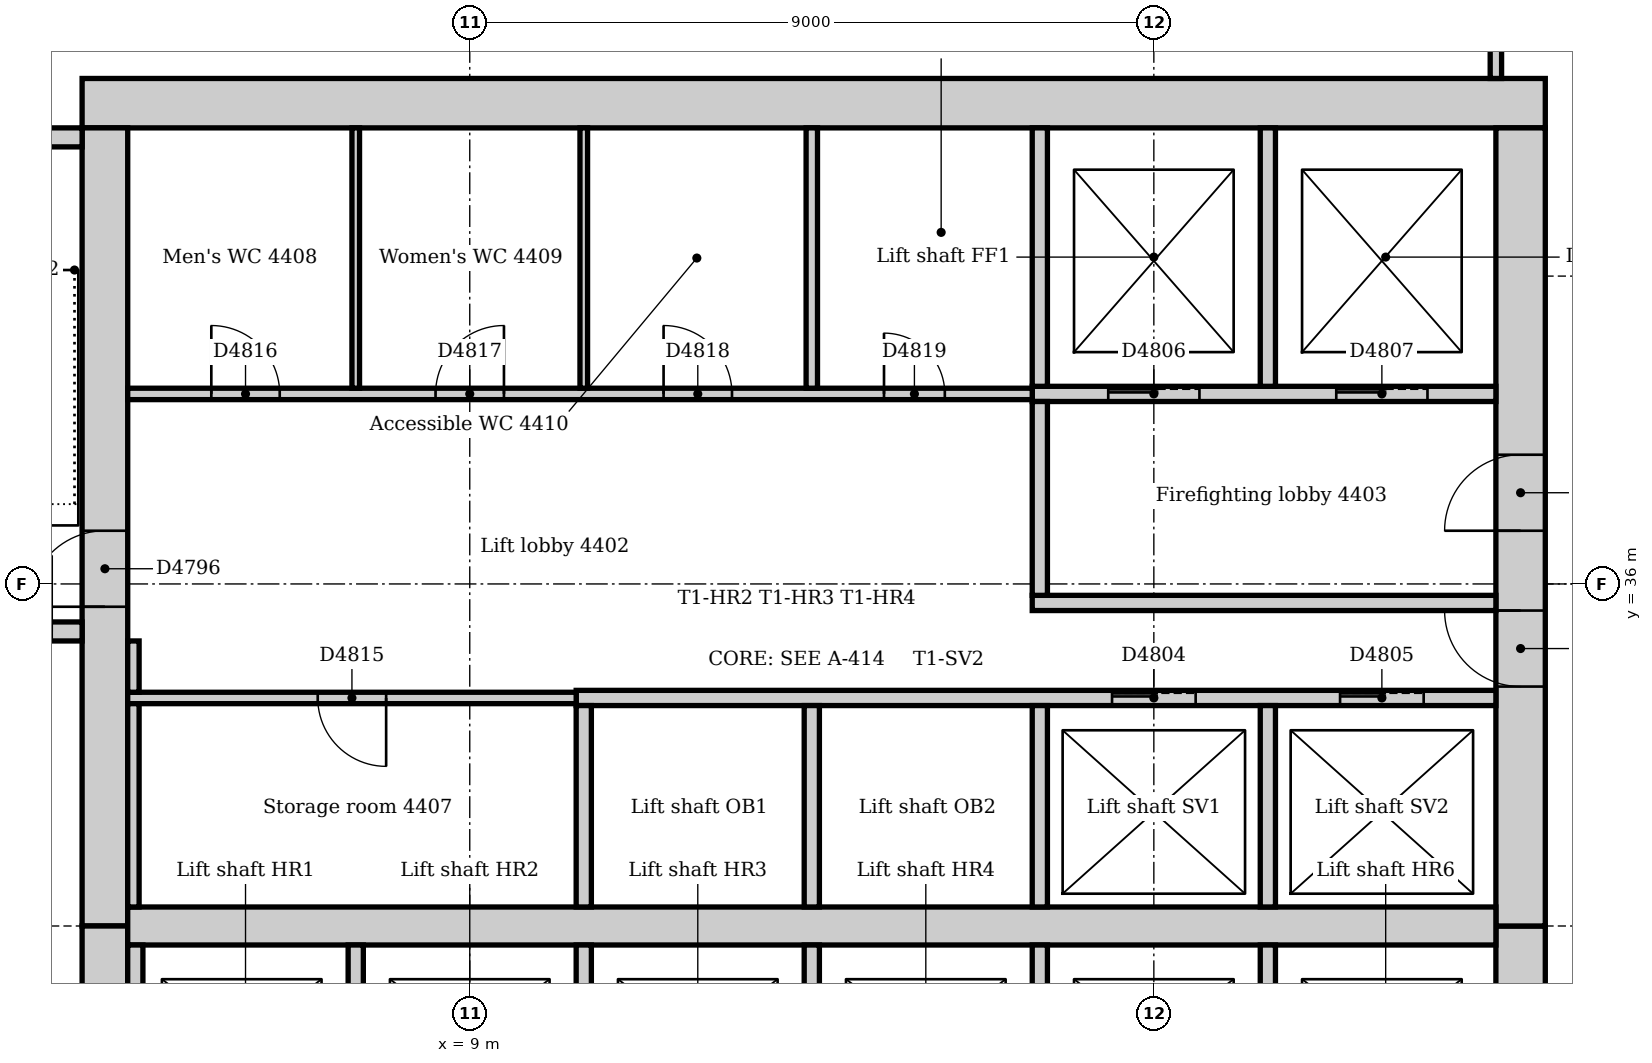
"""IFC4 building model, lengths in metres.
Left out: names, types, materials, properties, quantities, classifications, styles, units other than length and angle.
Written with IfcOpenShell. Run it as: python <this file> out.ifc"""

import sys

from ifc_helpers import new_model, si_unit, direction, frame, frame_2d, origin, place, context, subcontext, project, spatial, rectangle, extrude, element, fill, save


model = new_model("IFC4")
c1 = context("Model", 3, precision=1e-05, world=origin(), true_north=direction((0.0, 1.0)))
c2 = subcontext(c1, "Body", "Model", "MODEL_VIEW")
j1 = project(units=[si_unit("LENGTHUNIT", "METRE"), si_unit("PLANEANGLEUNIT", "RADIAN")], contexts=[c1])
p1 = place(None, origin())
s1 = spatial("IfcSite", under=j1, at=p1, CompositionType="ELEMENT")
p2 = place(p1, origin())
s2 = spatial("IfcBuilding", under=s1, at=p2, CompositionType="ELEMENT")
p3 = place(p2, frame((0.0, 0.0, 185.0)))
s3 = spatial("IfcBuildingStorey", under=s2, at=p3, CompositionType="ELEMENT", Elevation=185.0)
p4 = place(p3, frame((23.15, 42.325, 0.0), z_axis=(0.0, 0.0, 1.0), x_axis=(-1.0, 0.0, 0.0)))
e1 = element("IfcWall", 1, at=p4, inside=s3, PredefinedType="SOLIDWALL", context=c2, shape_type="SweptSolid", body=[
    extrude(rectangle(XDim=19.25, YDim=0.65, at=frame_2d((9.625, 0.0))), origin(), (0.0, 0.0, 1.0), 4.0),
])
p5 = place(p3, frame((22.825, 21.0, 0.0), z_axis=(0.0, 0.0, 1.0), x_axis=(0.0, 1.0, 0.0)))
e2 = element("IfcWall", 2, at=p5, inside=s3, PredefinedType="SOLIDWALL", context=c2, shape_type="SweptSolid", body=[
    extrude(rectangle(XDim=10.5, YDim=0.65, at=frame_2d((5.25, 0.0))), origin(), (0.0, 0.0, 1.0), 4.0),
])
p6 = place(p5, frame((4.35, 0.0, 0.0)))
e3 = element("IfcOpeningElement", 3, at=p6, cuts=e2, PredefinedType="OPENING", context=c2, shape_type="SweptSolid", body=[
    extrude(rectangle(XDim=1.8, YDim=2.1, at=frame_2d((0.9, 1.05))), frame((0.0, 0.335, 0.0), z_axis=(0.0, -1.0, 0.0), x_axis=(1.0, 0.0, 0.0)), (0.0, 0.0, 1.0), 0.67),
])
p7 = place(p3, frame((22.825, 31.5, 0.0), z_axis=(0.0, 0.0, 1.0), x_axis=(0.0, 1.0, 0.0)))
e4 = element("IfcWall", 4, at=p7, inside=s3, PredefinedType="SOLIDWALL", context=c2, shape_type="SweptSolid", body=[
    extrude(rectangle(XDim=10.5, YDim=0.65, at=frame_2d((5.25, 0.0))), origin(), (0.0, 0.0, 1.0), 4.0),
])
p8 = place(p7, frame((3.15, 0.0, 0.0)))
e5 = element("IfcOpeningElement", 5, at=p8, cuts=e4, PredefinedType="OPENING", context=c2, shape_type="SweptSolid", body=[
    extrude(rectangle(XDim=1.0, YDim=2.1, at=frame_2d((0.5, 1.05))), frame((0.0, 0.335, 0.0), z_axis=(0.0, -1.0, 0.0), x_axis=(1.0, 0.0, 0.0)), (0.0, 0.0, 1.0), 0.67),
])
p9 = place(p7, frame((5.2, 0.0, 0.0)))
e6 = element("IfcOpeningElement", 6, at=p9, cuts=e4, PredefinedType="OPENING", context=c2, shape_type="SweptSolid", body=[
    extrude(rectangle(XDim=1.0, YDim=2.1, at=frame_2d((0.5, 1.05))), frame((0.0, 0.335, 0.0), z_axis=(0.0, -1.0, 0.0), x_axis=(1.0, 0.0, 0.0)), (0.0, 0.0, 1.0), 0.67),
])
p10 = place(p3, frame((4.2, 42.0, 0.0), z_axis=(0.0, 0.0, 1.0), x_axis=(0.0, -1.0, 0.0)))
e7 = element("IfcWall", 7, at=p10, inside=s3, PredefinedType="SOLIDWALL", context=c2, shape_type="SweptSolid", body=[
    extrude(rectangle(XDim=10.5, YDim=0.6, at=frame_2d((5.25, 0.0))), origin(), (0.0, 0.0, 1.0), 4.0),
])
p11 = place(p10, frame((5.3, 0.0, 0.0)))
e8 = element("IfcOpeningElement", 8, at=p11, cuts=e7, PredefinedType="OPENING", context=c2, shape_type="SweptSolid", body=[
    extrude(rectangle(XDim=1.0, YDim=2.1, at=frame_2d((0.5, 1.05))), frame((0.0, 0.31, 0.0), z_axis=(0.0, -1.0, 0.0), x_axis=(1.0, 0.0, 0.0)), (0.0, 0.0, 1.0), 0.62),
])
p12 = place(p3, frame((4.2, 31.5, 0.0), z_axis=(0.0, 0.0, 1.0), x_axis=(0.0, -1.0, 0.0)))
e9 = element("IfcWall", 9, at=p12, inside=s3, PredefinedType="SOLIDWALL", context=c2, shape_type="SweptSolid", body=[
    extrude(rectangle(XDim=10.5, YDim=0.6, at=frame_2d((5.25, 0.0))), origin(), (0.0, 0.0, 1.0), 4.0),
])
p13 = place(p12, frame((4.25, 0.0, 0.0)))
e10 = element("IfcOpeningElement", 10, at=p13, cuts=e9, PredefinedType="OPENING", context=c2, shape_type="SweptSolid", body=[
    extrude(rectangle(XDim=1.0, YDim=2.1, at=frame_2d((0.5, 1.05))), frame((0.0, 0.31, 0.0), z_axis=(0.0, -1.0, 0.0), x_axis=(1.0, 0.0, 0.0)), (0.0, 0.0, 1.0), 0.62),
])
p14 = place(p3, frame((4.5, 31.5, 0.0), z_axis=(0.0, 0.0, 1.0), x_axis=(1.0, 0.0, 0.0)))
e11 = element("IfcWall", 11, at=p14, inside=s3, PredefinedType="SOLIDWALL", context=c2, shape_type="SweptSolid", body=[
    extrude(rectangle(XDim=18.0, YDim=0.5, at=frame_2d((9.0, 0.0))), origin(), (0.0, 0.0, 1.0), 4.0),
])
p15 = place(p3, frame((0.36, 35.375, 0.0), z_axis=(0.0, 0.0, 1.0), x_axis=(1.0, 0.0, 0.0)))
e12 = element("IfcWall", 12, at=p15, inside=s3, PredefinedType="SOLIDWALL", context=c2, shape_type="SweptSolid", body=[
    extrude(rectangle(XDim=3.54, YDim=0.25, at=frame_2d((1.77, 0.0))), origin(), (0.0, 0.0, 1.0), 4.0),
])
p16 = place(p15, frame((2.14, 0.0, 0.0)))
e13 = element("IfcOpeningElement", 13, at=p16, cuts=e12, PredefinedType="OPENING", context=c2, shape_type="SweptSolid", body=[
    extrude(rectangle(XDim=1.0, YDim=2.1, at=frame_2d((0.5, 1.05))), frame((0.0, 0.135, 0.0), z_axis=(0.0, -1.0, 0.0), x_axis=(1.0, 0.0, 0.0)), (0.0, 0.0, 1.0), 0.27),
])
p17 = place(p3, frame((3.9, 41.875, 0.0), z_axis=(0.0, 0.0, 1.0), x_axis=(-1.0, 0.0, 0.0)))
e14 = element("IfcWall", 14, at=p17, inside=s3, PredefinedType="SOLIDWALL", context=c2, shape_type="SweptSolid", body=[
    extrude(rectangle(XDim=3.54, YDim=0.25, at=frame_2d((1.77, 0.0))), origin(), (0.0, 0.0, 1.0), 4.0),
])
p18 = place(p3, frame((16.4, 35.75, 0.0), z_axis=(0.0, 0.0, 1.0), x_axis=(1.0, 0.0, 0.0)))
e15 = element("IfcWall", 15, at=p18, inside=s3, PredefinedType="PARTITIONING", context=c2, shape_type="SweptSolid", body=[
    extrude(rectangle(XDim=6.1, YDim=0.2, at=frame_2d((3.05, 0.0))), origin(), (0.0, 0.0, 1.0), 3.85),
])
p19 = place(p3, frame((16.4, 38.5, 0.0), z_axis=(0.0, 0.0, 1.0), x_axis=(1.0, 0.0, 0.0)))
e16 = element("IfcWall", 16, at=p19, inside=s3, PredefinedType="PARTITIONING", context=c2, shape_type="SweptSolid", body=[
    extrude(rectangle(XDim=6.1, YDim=0.2, at=frame_2d((3.05, 0.0))), origin(), (0.0, 0.0, 1.0), 3.85),
])
p20 = place(p19, frame((1.0, 0.0, 0.0)))
e17 = element("IfcOpeningElement", 17, at=p20, cuts=e16, PredefinedType="OPENING", context=c2, shape_type="SweptSolid", body=[
    extrude(rectangle(XDim=1.2, YDim=2.1, at=frame_2d((0.6, 1.05))), frame((0.0, 0.11, 0.0), z_axis=(0.0, -1.0, 0.0), x_axis=(1.0, 0.0, 0.0)), (0.0, 0.0, 1.0), 0.22),
])
p21 = place(p19, frame((4.0, 0.0, 0.0)))
e18 = element("IfcOpeningElement", 18, at=p21, cuts=e16, PredefinedType="OPENING", context=c2, shape_type="SweptSolid", body=[
    extrude(rectangle(XDim=1.2, YDim=2.1, at=frame_2d((0.6, 1.05))), frame((0.0, 0.11, 0.0), z_axis=(0.0, -1.0, 0.0), x_axis=(1.0, 0.0, 0.0)), (0.0, 0.0, 1.0), 0.22),
])
p22 = place(p3, frame((16.5, 35.85, 0.0), z_axis=(0.0, 0.0, 1.0), x_axis=(0.0, 1.0, 0.0)))
e19 = element("IfcWall", 19, at=p22, inside=s3, PredefinedType="PARTITIONING", context=c2, shape_type="SweptSolid", body=[
    extrude(rectangle(XDim=2.55, YDim=0.2, at=frame_2d((1.275, 0.0))), origin(), (0.0, 0.0, 1.0), 3.85),
])
p23 = place(p3, frame((10.4, 34.5, 0.0), z_axis=(0.0, 0.0, 1.0), x_axis=(1.0, 0.0, 0.0)))
e20 = element("IfcWall", 20, at=p23, inside=s3, PredefinedType="PARTITIONING", context=c2, shape_type="SweptSolid", body=[
    extrude(rectangle(XDim=12.1, YDim=0.2, at=frame_2d((6.05, 0.0))), origin(), (0.0, 0.0, 1.0), 3.85),
])
p24 = place(p23, frame((7.05, 0.0, 0.0)))
e21 = element("IfcOpeningElement", 21, at=p24, cuts=e20, PredefinedType="OPENING", context=c2, shape_type="SweptSolid", body=[
    extrude(rectangle(XDim=1.1, YDim=2.1, at=frame_2d((0.55, 1.05))), frame((0.0, 0.11, 0.0), z_axis=(0.0, -1.0, 0.0), x_axis=(1.0, 0.0, 0.0)), (0.0, 0.0, 1.0), 0.22),
])
p25 = place(p23, frame((10.05, 0.0, 0.0)))
e22 = element("IfcOpeningElement", 22, at=p25, cuts=e20, PredefinedType="OPENING", context=c2, shape_type="SweptSolid", body=[
    extrude(rectangle(XDim=1.1, YDim=2.1, at=frame_2d((0.55, 1.05))), frame((0.0, 0.11, 0.0), z_axis=(0.0, -1.0, 0.0), x_axis=(1.0, 0.0, 0.0)), (0.0, 0.0, 1.0), 0.22),
])
for number, where, z_axis, x_axis in (
    (23, (10.5, 28.6, 0.0), (0.0, 0.0, 1.0), (0.0, 1.0, 0.0)),
    (24, (10.5, 31.75, 0.0), (0.0, 0.0, 1.0), (0.0, 1.0, 0.0)),
    (25, (13.5, 28.6, 0.0), (0.0, 0.0, 1.0), (0.0, 1.0, 0.0)),
    (26, (13.5, 31.75, 0.0), (0.0, 0.0, 1.0), (0.0, 1.0, 0.0)),
    (27, (16.5, 28.6, 0.0), (0.0, 0.0, 1.0), (0.0, 1.0, 0.0)),
    (28, (16.5, 31.75, 0.0), (0.0, 0.0, 1.0), (0.0, 1.0, 0.0)),
    (29, (19.5, 28.6, 0.0), (0.0, 0.0, 1.0), (0.0, 1.0, 0.0)),
    (30, (19.5, 31.75, 0.0), (0.0, 0.0, 1.0), (0.0, 1.0, 0.0)),
):
    element("IfcWall", number, at=place(p3, frame(where, z_axis=z_axis, x_axis=x_axis)), inside=s3, PredefinedType="PARTITIONING", context=c2, shape_type="SweptSolid", body=[
        extrude(rectangle(XDim=2.65, YDim=0.2, at=frame_2d((1.325, 0.0))), origin(), (0.0, 0.0, 1.0), 3.85),
    ])
for number, where, z_axis, x_axis in (
    (31, (16.5, 38.6, 0.0), (0.0, 0.0, 1.0), (0.0, 1.0, 0.0)),
    (32, (19.5, 38.6, 0.0), (0.0, 0.0, 1.0), (0.0, 1.0, 0.0)),
):
    element("IfcWall", number, at=place(p3, frame(where, z_axis=z_axis, x_axis=x_axis)), inside=s3, PredefinedType="PARTITIONING", context=c2, shape_type="SweptSolid", body=[
        extrude(rectangle(XDim=3.4, YDim=0.2, at=frame_2d((1.7, 0.0))), origin(), (0.0, 0.0, 1.0), 3.85),
    ])
for number, where, z_axis, x_axis in (
    (33, (4.6, 28.6, 0.0), (0.0, 0.0, 1.0), (0.0, 1.0, 0.0)),
    (34, (7.5, 28.6, 0.0), (0.0, 0.0, 1.0), (0.0, 1.0, 0.0)),
):
    element("IfcWall", number, at=place(p3, frame(where, z_axis=z_axis, x_axis=x_axis)), inside=s3, PredefinedType="PARTITIONING", context=c2, shape_type="SweptSolid", body=[
        extrude(rectangle(XDim=2.65, YDim=0.2, at=frame_2d((1.325, 0.0))), origin(), (0.0, 0.0, 1.0), 3.85),
    ])
p26 = place(p3, frame((4.5, 38.5, 0.0), z_axis=(0.0, 0.0, 1.0), x_axis=(1.0, 0.0, 0.0)))
e35 = element("IfcWall", 35, at=p26, inside=s3, PredefinedType="PARTITIONING", context=c2, shape_type="SweptSolid", body=[
    extrude(rectangle(XDim=11.9, YDim=0.15, at=frame_2d((5.95, 0.0))), origin(), (0.0, 0.0, 1.0), 3.85),
])
p27 = place(p26, frame((1.1, 0.0, 0.0)))
e36 = element("IfcOpeningElement", 36, at=p27, cuts=e35, PredefinedType="OPENING", context=c2, shape_type="SweptSolid", body=[
    extrude(rectangle(XDim=0.9, YDim=2.1, at=frame_2d((0.45, 1.05))), frame((0.0, 0.085, 0.0), z_axis=(0.0, -1.0, 0.0), x_axis=(1.0, 0.0, 0.0)), (0.0, 0.0, 1.0), 0.17),
])
p28 = place(p26, frame((4.05, 0.0, 0.0)))
e37 = element("IfcOpeningElement", 37, at=p28, cuts=e35, PredefinedType="OPENING", context=c2, shape_type="SweptSolid", body=[
    extrude(rectangle(XDim=0.9, YDim=2.1, at=frame_2d((0.45, 1.05))), frame((0.0, 0.085, 0.0), z_axis=(0.0, -1.0, 0.0), x_axis=(1.0, 0.0, 0.0)), (0.0, 0.0, 1.0), 0.17),
])
p29 = place(p26, frame((7.05, 0.0, 0.0)))
e38 = element("IfcOpeningElement", 38, at=p29, cuts=e35, PredefinedType="OPENING", context=c2, shape_type="SweptSolid", body=[
    extrude(rectangle(XDim=0.9, YDim=2.1, at=frame_2d((0.45, 1.05))), frame((0.0, 0.085, 0.0), z_axis=(0.0, -1.0, 0.0), x_axis=(1.0, 0.0, 0.0)), (0.0, 0.0, 1.0), 0.17),
])
p30 = place(p26, frame((9.95, 0.0, 0.0)))
e39 = element("IfcOpeningElement", 39, at=p30, cuts=e35, PredefinedType="OPENING", context=c2, shape_type="SweptSolid", body=[
    extrude(rectangle(XDim=0.8, YDim=2.1, at=frame_2d((0.4, 1.05))), frame((0.0, 0.085, 0.0), z_axis=(0.0, -1.0, 0.0), x_axis=(1.0, 0.0, 0.0)), (0.0, 0.0, 1.0), 0.17),
])
p31 = place(p3, frame((4.5, 34.5, 0.0), z_axis=(0.0, 0.0, 1.0), x_axis=(1.0, 0.0, 0.0)))
e40 = element("IfcWall", 40, at=p31, inside=s3, PredefinedType="PARTITIONING", context=c2, shape_type="SweptSolid", body=[
    extrude(rectangle(XDim=5.9, YDim=0.15, at=frame_2d((2.95, 0.0))), origin(), (0.0, 0.0, 1.0), 3.85),
])
p32 = place(p31, frame((2.5, 0.0, 0.0)))
e41 = element("IfcOpeningElement", 41, at=p32, cuts=e40, PredefinedType="OPENING", context=c2, shape_type="SweptSolid", body=[
    extrude(rectangle(XDim=0.9, YDim=2.1, at=frame_2d((0.45, 1.05))), frame((0.0, 0.085, 0.0), z_axis=(0.0, -1.0, 0.0), x_axis=(1.0, 0.0, 0.0)), (0.0, 0.0, 1.0), 0.17),
])
p33 = place(p3, frame((4.575, 34.575, 0.0), z_axis=(0.0, 0.0, 1.0), x_axis=(0.0, 1.0, 0.0)))
e42 = element("IfcWall", 42, at=p33, inside=s3, PredefinedType="PARTITIONING", context=c2, shape_type="SweptSolid", body=[
    extrude(rectangle(XDim=0.675, YDim=0.15, at=frame_2d((0.338, 0.0))), origin(), (0.0, 0.0, 1.0), 3.85),
])
p34 = place(p3, frame((4.575, 31.75, 0.0), z_axis=(0.0, 0.0, 1.0), x_axis=(0.0, 1.0, 0.0)))
e43 = element("IfcWall", 43, at=p34, inside=s3, PredefinedType="PARTITIONING", context=c2, shape_type="SweptSolid", body=[
    extrude(rectangle(XDim=2.675, YDim=0.15, at=frame_2d((1.337, 0.0))), origin(), (0.0, 0.0, 1.0), 3.85),
])
p35 = place(p3, frame((22.5, 42.65, 0.0), z_axis=(0.0, 0.0, 1.0), x_axis=(0.0, 1.0, 0.0)))
e44 = element("IfcWall", 44, at=p35, inside=s3, PredefinedType="PARTITIONING", context=c2, shape_type="SweptSolid", body=[
    extrude(rectangle(XDim=1.825, YDim=0.15, at=frame_2d((0.912, 0.0))), origin(), (0.0, 0.0, 1.0), 3.85),
])
p36 = place(p3, frame((13.5, 38.575, 0.0), z_axis=(0.0, 0.0, 1.0), x_axis=(0.0, 1.0, 0.0)))
e45 = element("IfcWall", 45, at=p36, inside=s3, PredefinedType="PARTITIONING", context=c2, shape_type="SweptSolid", body=[
    extrude(rectangle(XDim=3.425, YDim=0.15, at=frame_2d((1.712, 0.0))), origin(), (0.0, 0.0, 1.0), 3.85),
])
for number, where, z_axis, x_axis in (
    (46, (7.5, 38.575, 0.0), (0.0, 0.0, 1.0), (0.0, 1.0, 0.0)),
    (47, (10.5, 38.575, 0.0), (0.0, 0.0, 1.0), (0.0, 1.0, 0.0)),
):
    element("IfcWall", number, at=place(p3, frame(where, z_axis=z_axis, x_axis=x_axis)), inside=s3, PredefinedType="PARTITIONING", context=c2, shape_type="SweptSolid", body=[
        extrude(rectangle(XDim=3.425, YDim=0.1, at=frame_2d((1.712, 0.0))), origin(), (0.0, 0.0, 1.0), 3.85),
    ])
p37 = place(p11, frame((1.0, 0.0, 0.0), z_axis=(0.0, 0.0, 1.0), x_axis=(-1.0, 0.0, 0.0)))
e48 = element("IfcDoor", 48, at=p37, inside=s3, OperationType="SINGLE_SWING_LEFT", PredefinedType="DOOR", context=c2, shape_type="SweptSolid", body=[
    extrude(rectangle(XDim=1.0, YDim=2.1, at=frame_2d((0.5, 1.05))), frame((0.0, 0.025, 0.0), z_axis=(0.0, -1.0, 0.0), x_axis=(1.0, 0.0, 0.0)), (0.0, 0.0, 1.0), 0.05),
])
fill(e8, e48)
p38 = place(p24, origin())
e49 = element("IfcDoor", 49, at=p38, inside=s3, OperationType="SLIDING_TO_LEFT", PredefinedType="DOOR", context=c2, shape_type="SweptSolid", body=[
    extrude(rectangle(XDim=1.1, YDim=2.1, at=frame_2d((0.55, 1.05))), frame((0.0, 0.025, 0.0), z_axis=(0.0, -1.0, 0.0), x_axis=(1.0, 0.0, 0.0)), (0.0, 0.0, 1.0), 0.05),
])
fill(e21, e49)
p39 = place(p25, origin())
e50 = element("IfcDoor", 50, at=p39, inside=s3, OperationType="SLIDING_TO_LEFT", PredefinedType="DOOR", context=c2, shape_type="SweptSolid", body=[
    extrude(rectangle(XDim=1.1, YDim=2.1, at=frame_2d((0.55, 1.05))), frame((0.0, 0.025, 0.0), z_axis=(0.0, -1.0, 0.0), x_axis=(1.0, 0.0, 0.0)), (0.0, 0.0, 1.0), 0.05),
])
fill(e22, e50)
p40 = place(p20, origin())
e51 = element("IfcDoor", 51, at=p40, inside=s3, OperationType="SLIDING_TO_LEFT", PredefinedType="DOOR", context=c2, shape_type="SweptSolid", body=[
    extrude(rectangle(XDim=1.2, YDim=2.1, at=frame_2d((0.6, 1.05))), frame((0.0, 0.025, 0.0), z_axis=(0.0, -1.0, 0.0), x_axis=(1.0, 0.0, 0.0)), (0.0, 0.0, 1.0), 0.05),
])
fill(e17, e51)
p41 = place(p21, origin())
e52 = element("IfcDoor", 52, at=p41, inside=s3, OperationType="SLIDING_TO_LEFT", PredefinedType="DOOR", context=c2, shape_type="SweptSolid", body=[
    extrude(rectangle(XDim=1.2, YDim=2.1, at=frame_2d((0.6, 1.05))), frame((0.0, 0.025, 0.0), z_axis=(0.0, -1.0, 0.0), x_axis=(1.0, 0.0, 0.0)), (0.0, 0.0, 1.0), 0.05),
])
fill(e18, e52)
p42 = place(p8, origin())
e53 = element("IfcDoor", 53, at=p42, inside=s3, OperationType="SINGLE_SWING_RIGHT", PredefinedType="DOOR", context=c2, shape_type="SweptSolid", body=[
    extrude(rectangle(XDim=1.0, YDim=2.1, at=frame_2d((0.5, 1.05))), frame((0.0, 0.025, 0.0), z_axis=(0.0, -1.0, 0.0), x_axis=(1.0, 0.0, 0.0)), (0.0, 0.0, 1.0), 0.05),
])
fill(e5, e53)
p43 = place(p9, origin())
e54 = element("IfcDoor", 54, at=p43, inside=s3, OperationType="SINGLE_SWING_LEFT", PredefinedType="DOOR", context=c2, shape_type="SweptSolid", body=[
    extrude(rectangle(XDim=1.0, YDim=2.1, at=frame_2d((0.5, 1.05))), frame((0.0, 0.025, 0.0), z_axis=(0.0, -1.0, 0.0), x_axis=(1.0, 0.0, 0.0)), (0.0, 0.0, 1.0), 0.05),
])
fill(e6, e54)
p44 = place(p32, frame((0.9, 0.0, 0.0), z_axis=(0.0, 0.0, 1.0), x_axis=(-1.0, 0.0, 0.0)))
e55 = element("IfcDoor", 55, at=p44, inside=s3, OperationType="SINGLE_SWING_LEFT", PredefinedType="DOOR", context=c2, shape_type="SweptSolid", body=[
    extrude(rectangle(XDim=0.9, YDim=2.1, at=frame_2d((0.45, 1.05))), frame((0.0, 0.025, 0.0), z_axis=(0.0, -1.0, 0.0), x_axis=(1.0, 0.0, 0.0)), (0.0, 0.0, 1.0), 0.05),
])
fill(e41, e55)
p45 = place(p27, origin())
e56 = element("IfcDoor", 56, at=p45, inside=s3, OperationType="SINGLE_SWING_LEFT", PredefinedType="DOOR", context=c2, shape_type="SweptSolid", body=[
    extrude(rectangle(XDim=0.9, YDim=2.1, at=frame_2d((0.45, 1.05))), frame((0.0, 0.025, 0.0), z_axis=(0.0, -1.0, 0.0), x_axis=(1.0, 0.0, 0.0)), (0.0, 0.0, 1.0), 0.05),
])
fill(e36, e56)
p46 = place(p28, origin())
e57 = element("IfcDoor", 57, at=p46, inside=s3, OperationType="SINGLE_SWING_RIGHT", PredefinedType="DOOR", context=c2, shape_type="SweptSolid", body=[
    extrude(rectangle(XDim=0.9, YDim=2.1, at=frame_2d((0.45, 1.05))), frame((0.0, 0.025, 0.0), z_axis=(0.0, -1.0, 0.0), x_axis=(1.0, 0.0, 0.0)), (0.0, 0.0, 1.0), 0.05),
])
fill(e37, e57)
p47 = place(p29, origin())
e58 = element("IfcDoor", 58, at=p47, inside=s3, OperationType="SINGLE_SWING_LEFT", PredefinedType="DOOR", context=c2, shape_type="SweptSolid", body=[
    extrude(rectangle(XDim=0.9, YDim=2.1, at=frame_2d((0.45, 1.05))), frame((0.0, 0.025, 0.0), z_axis=(0.0, -1.0, 0.0), x_axis=(1.0, 0.0, 0.0)), (0.0, 0.0, 1.0), 0.05),
])
fill(e38, e58)
p48 = place(p30, origin())
e59 = element("IfcDoor", 59, at=p48, inside=s3, OperationType="SINGLE_SWING_LEFT", PredefinedType="DOOR", context=c2, shape_type="SweptSolid", body=[
    extrude(rectangle(XDim=0.8, YDim=2.1, at=frame_2d((0.4, 1.05))), frame((0.0, 0.025, 0.0), z_axis=(0.0, -1.0, 0.0), x_axis=(1.0, 0.0, 0.0)), (0.0, 0.0, 1.0), 0.05),
])
fill(e39, e59)
save(model, sys.argv[1])
